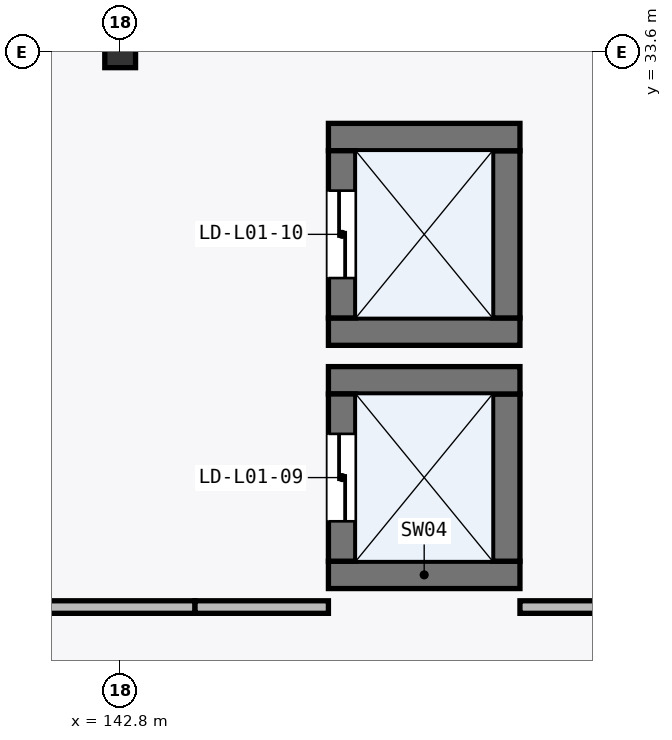
"""IFC4 building model, lengths in metres.
Left out: names, types, materials, properties, quantities, classifications, styles, units other than length and angle.
Written with IfcOpenShell. Run it as: python <this file> out.ifc"""

import sys

from ifc_helpers import new_model, si_unit, direction, frame, frame_2d, origin, origin_2d, place, context, subcontext, project, spatial, rectangle, i_section, extrude, element, fill, save


model = new_model("IFC4")
c1 = context("Model", 3, precision=1e-05, world=origin(), true_north=direction((0.0, 1.0)))
c2 = subcontext(c1, "Body", "Model", "MODEL_VIEW")
j1 = project(units=[si_unit("LENGTHUNIT", "METRE"), si_unit("PLANEANGLEUNIT", "RADIAN")], contexts=[c1])
p1 = place(None, origin())
s1 = spatial("IfcSite", under=j1, at=p1, CompositionType="ELEMENT")
p2 = place(p1, origin())
s2 = spatial("IfcBuilding", under=s1, at=p2, CompositionType="ELEMENT")
p3 = place(p2, origin())
s3 = spatial("IfcBuildingStorey", under=s2, at=p3, CompositionType="ELEMENT", Elevation=0.0)
p4 = place(p3, frame((142.8, 33.6, 0.0), z_axis=(0.0, 0.0, 1.0), x_axis=(1.0, 0.0, 0.0)))
e1 = element("IfcColumn", 1, at=p4, inside=s3, PredefinedType="COLUMN", context=c2, shape_type="SweptSolid", body=[
    extrude(i_section(OverallWidth=0.405, OverallDepth=0.414, WebThickness=0.018, FlangeThickness=0.028, FilletRadius=0.022, at=origin_2d()), origin(), (0.0, 0.0, 1.0), 6.0),
])
p5 = place(p3, frame((145.54, 26.72, 0.0), z_axis=(0.0, 0.0, 1.0), x_axis=(1.0, 0.0, 0.0)))
e2 = element("IfcWall", 2, at=p5, inside=s3, PredefinedType="SHEAR", context=c2, shape_type="SweptSolid", body=[
    extrude(rectangle(XDim=2.52, YDim=0.36, at=frame_2d((1.26, 0.0))), origin(), (0.0, 0.0, 1.0), 5.745),
])
p6 = place(p3, frame((147.88, 26.9, 0.0), z_axis=(0.0, 0.0, 1.0), x_axis=(0.0, 1.0, 0.0)))
e3 = element("IfcWall", 3, at=p6, inside=s3, PredefinedType="SHEAR", context=c2, shape_type="SweptSolid", body=[
    extrude(rectangle(XDim=2.2, YDim=0.36, at=frame_2d((1.1, 0.0))), origin(), (0.0, 0.0, 1.0), 5.745),
])
p7 = place(p3, frame((148.06, 29.28, 0.0), z_axis=(0.0, 0.0, 1.0), x_axis=(-1.0, 0.0, 0.0)))
e4 = element("IfcWall", 4, at=p7, inside=s3, PredefinedType="SHEAR", context=c2, shape_type="SweptSolid", body=[
    extrude(rectangle(XDim=2.52, YDim=0.36, at=frame_2d((1.26, 0.0))), origin(), (0.0, 0.0, 1.0), 5.745),
])
p8 = place(p3, frame((145.72, 29.1, 0.0), z_axis=(0.0, 0.0, 1.0), x_axis=(0.0, -1.0, 0.0)))
e5 = element("IfcWall", 5, at=p8, inside=s3, PredefinedType="SHEAR", context=c2, shape_type="SweptSolid", body=[
    extrude(rectangle(XDim=2.2, YDim=0.36, at=frame_2d((1.1, 0.0))), origin(), (0.0, 0.0, 1.0), 5.745),
])
p9 = place(p8, frame((0.525, 0.0, 0.0)))
e6 = element("IfcOpeningElement", 6, at=p9, cuts=e5, PredefinedType="OPENING", context=c2, shape_type="SweptSolid", body=[
    extrude(rectangle(XDim=1.15, YDim=2.2, at=frame_2d((0.575, 1.1))), frame((0.0, 0.19, 0.0), z_axis=(0.0, -1.0, 0.0), x_axis=(1.0, 0.0, 0.0)), (0.0, 0.0, 1.0), 0.38),
])
p10 = place(p3, frame((145.54, 29.92, 0.0), z_axis=(0.0, 0.0, 1.0), x_axis=(1.0, 0.0, 0.0)))
e7 = element("IfcWall", 7, at=p10, inside=s3, PredefinedType="SHEAR", context=c2, shape_type="SweptSolid", body=[
    extrude(rectangle(XDim=2.52, YDim=0.36, at=frame_2d((1.26, 0.0))), origin(), (0.0, 0.0, 1.0), 5.745),
])
p11 = place(p3, frame((147.88, 30.1, 0.0), z_axis=(0.0, 0.0, 1.0), x_axis=(0.0, 1.0, 0.0)))
e8 = element("IfcWall", 8, at=p11, inside=s3, PredefinedType="SHEAR", context=c2, shape_type="SweptSolid", body=[
    extrude(rectangle(XDim=2.2, YDim=0.36, at=frame_2d((1.1, 0.0))), origin(), (0.0, 0.0, 1.0), 5.745),
])
p12 = place(p3, frame((148.06, 32.48, 0.0), z_axis=(0.0, 0.0, 1.0), x_axis=(-1.0, 0.0, 0.0)))
e9 = element("IfcWall", 9, at=p12, inside=s3, PredefinedType="SHEAR", context=c2, shape_type="SweptSolid", body=[
    extrude(rectangle(XDim=2.52, YDim=0.36, at=frame_2d((1.26, 0.0))), origin(), (0.0, 0.0, 1.0), 5.745),
])
p13 = place(p3, frame((145.72, 32.3, 0.0), z_axis=(0.0, 0.0, 1.0), x_axis=(0.0, -1.0, 0.0)))
e10 = element("IfcWall", 10, at=p13, inside=s3, PredefinedType="SHEAR", context=c2, shape_type="SweptSolid", body=[
    extrude(rectangle(XDim=2.2, YDim=0.36, at=frame_2d((1.1, 0.0))), origin(), (0.0, 0.0, 1.0), 5.745),
])
p14 = place(p13, frame((0.525, 0.0, 0.0)))
e11 = element("IfcOpeningElement", 11, at=p14, cuts=e10, PredefinedType="OPENING", context=c2, shape_type="SweptSolid", body=[
    extrude(rectangle(XDim=1.15, YDim=2.2, at=frame_2d((0.575, 1.1))), frame((0.0, 0.19, 0.0), z_axis=(0.0, -1.0, 0.0), x_axis=(1.0, 0.0, 0.0)), (0.0, 0.0, 1.0), 0.38),
])
p15 = place(p3, frame((136.51, 26.297, 0.0), z_axis=(0.0, 0.0, 1.0), x_axis=(1.0, 0.0, 0.0)))
e12 = element("IfcWall", 12, at=p15, inside=s3, PredefinedType="PARTITIONING", context=c2, shape_type="SweptSolid", body=[
    extrude(rectangle(XDim=7.275, YDim=0.165, at=frame_2d((3.637, 0.0))), origin(), (0.0, 0.0, 1.0), 5.745),
])
p16 = place(p15, frame((2.988, 0.0, 0.0)))
e13 = element("IfcOpeningElement", 13, at=p16, cuts=e12, PredefinedType="OPENING", context=c2, shape_type="SweptSolid", body=[
    extrude(rectangle(XDim=1.3, YDim=2.2, at=frame_2d((0.65, 1.1))), frame((0.0, 0.093, 0.0), z_axis=(0.0, -1.0, 0.0), x_axis=(1.0, 0.0, 0.0)), (0.0, 0.0, 1.0), 0.185),
])
p17 = place(p3, frame((148.06, 26.297, 0.0), z_axis=(0.0, 0.0, 1.0), x_axis=(1.0, 0.0, 0.0)))
e14 = element("IfcWall", 14, at=p17, inside=s3, PredefinedType="PARTITIONING", context=c2, shape_type="SweptSolid", body=[
    extrude(rectangle(XDim=3.005, YDim=0.165, at=frame_2d((1.502, 0.0))), origin(), (0.0, 0.0, 1.0), 5.745),
])
p18 = place(p3, frame((143.785, 26.297, 0.0), z_axis=(0.0, 0.0, 1.0), x_axis=(1.0, 0.0, 0.0)))
e15 = element("IfcWall", 15, at=p18, inside=s3, PredefinedType="PARTITIONING", context=c2, shape_type="SweptSolid", body=[
    extrude(rectangle(XDim=1.755, YDim=0.165, at=frame_2d((0.877, 0.0))), origin(), (0.0, 0.0, 1.0), 5.745),
])
p19 = place(p9, frame((1.15, 0.0, 0.0), z_axis=(0.0, 0.0, 1.0), x_axis=(-1.0, 0.0, 0.0)))
e16 = element("IfcDoor", 16, at=p19, inside=s3, OperationType="DOUBLE_DOOR_SLIDING", PredefinedType="DOOR", context=c2, shape_type="SweptSolid", body=[
    extrude(rectangle(XDim=1.15, YDim=2.2, at=frame_2d((0.575, 1.1))), frame((0.0, 0.025, 0.0), z_axis=(0.0, -1.0, 0.0), x_axis=(1.0, 0.0, 0.0)), (0.0, 0.0, 1.0), 0.05),
])
fill(e6, e16)
p20 = place(p14, frame((1.15, 0.0, 0.0), z_axis=(0.0, 0.0, 1.0), x_axis=(-1.0, 0.0, 0.0)))
e17 = element("IfcDoor", 17, at=p20, inside=s3, OperationType="DOUBLE_DOOR_SLIDING", PredefinedType="DOOR", context=c2, shape_type="SweptSolid", body=[
    extrude(rectangle(XDim=1.15, YDim=2.2, at=frame_2d((0.575, 1.1))), frame((0.0, 0.025, 0.0), z_axis=(0.0, -1.0, 0.0), x_axis=(1.0, 0.0, 0.0)), (0.0, 0.0, 1.0), 0.05),
])
fill(e11, e17)
save(model, sys.argv[1])
